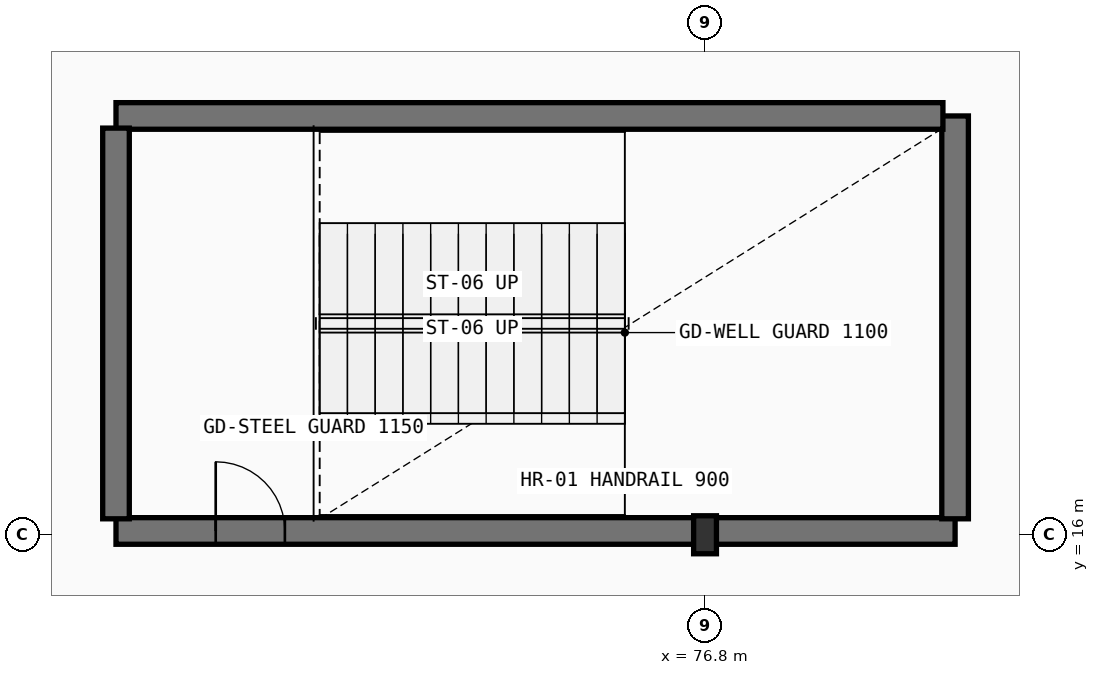
"""IFC4 building model, lengths in metres.
Left out: names, types, materials, properties, quantities, classifications, styles, units other than length and angle.
Written with IfcOpenShell. Run it as: python <this file> out.ifc"""

import sys

from ifc_helpers import new_model, si_unit, direction, frame, frame_2d, origin, origin_2d, place, context, subcontext, project, spatial, rectangle, i_section, extrude, element, fill, save


model = new_model("IFC4")
c1 = context("Model", 3, precision=1e-05, world=origin(), true_north=direction((0.0, 1.0)))
c2 = subcontext(c1, "Body", "Model", "MODEL_VIEW")
j1 = project(units=[si_unit("LENGTHUNIT", "METRE"), si_unit("PLANEANGLEUNIT", "RADIAN")], contexts=[c1])
p1 = place(None, origin())
s1 = spatial("IfcSite", under=j1, at=p1, CompositionType="ELEMENT")
p2 = place(p1, origin())
s2 = spatial("IfcBuilding", under=s1, at=p2, CompositionType="ELEMENT")
p3 = place(p2, frame((0.0, 0.0, 20.4)))
s3 = spatial("IfcBuildingStorey", under=s2, at=p3, CompositionType="ELEMENT", Elevation=20.4)
p4 = place(p3, frame((76.8, 16.0, 0.0), z_axis=(0.0, 0.0, 1.0), x_axis=(1.0, 0.0, 0.0)))
e1 = element("IfcColumn", 1, at=p4, inside=s3, PredefinedType="COLUMN", context=c2, shape_type="SweptSolid", body=[
    extrude(i_section(OverallWidth=0.3, OverallDepth=0.5, WebThickness=0.014, FlangeThickness=0.028, FilletRadius=0.027, at=origin_2d()), origin(), (0.0, 0.0, 1.0), 4.5),
])
p5 = place(p3, frame((69.05, 16.05, 0.0), z_axis=(0.0, 0.0, 1.0), x_axis=(1.0, 0.0, 0.0)))
e2 = element("IfcWall", 2, at=p5, inside=s3, PredefinedType="SHEAR", context=c2, shape_type="SweptSolid", body=[
    extrude(rectangle(XDim=11.04, YDim=0.35, at=frame_2d((5.52, 0.0))), origin(), (0.0, 0.0, 1.0), 4.25),
])
p6 = place(p5, frame((1.312, 0.0, 0.0)))
e3 = element("IfcOpeningElement", 3, at=p6, cuts=e2, PredefinedType="OPENING", context=c2, shape_type="SweptSolid", body=[
    extrude(rectangle(XDim=0.91, YDim=2.08, at=frame_2d((0.455, 1.04))), frame((0.0, 0.185, 0.0), z_axis=(0.0, -1.0, 0.0), x_axis=(1.0, 0.0, 0.0)), (0.0, 0.0, 1.0), 0.37),
])
p7 = place(p3, frame((80.09, 16.21, 0.0), z_axis=(0.0, 0.0, 1.0), x_axis=(0.0, 1.0, 0.0)))
e4 = element("IfcWall", 4, at=p7, inside=s3, PredefinedType="SHEAR", context=c2, shape_type="SweptSolid", body=[
    extrude(rectangle(XDim=5.3, YDim=0.35, at=frame_2d((2.65, 0.0))), origin(), (0.0, 0.0, 1.0), 4.25),
])
p8 = place(p3, frame((79.93, 21.51, 0.0), z_axis=(0.0, 0.0, 1.0), x_axis=(-1.0, 0.0, 0.0)))
e5 = element("IfcWall", 5, at=p8, inside=s3, PredefinedType="SHEAR", context=c2, shape_type="SweptSolid", body=[
    extrude(rectangle(XDim=10.88, YDim=0.35, at=frame_2d((5.44, 0.0))), origin(), (0.0, 0.0, 1.0), 4.25),
])
p9 = place(p3, frame((69.05, 21.35, 0.0), z_axis=(0.0, 0.0, 1.0), x_axis=(0.0, -1.0, 0.0)))
e6 = element("IfcWall", 6, at=p9, inside=s3, PredefinedType="SHEAR", context=c2, shape_type="SweptSolid", body=[
    extrude(rectangle(XDim=5.14, YDim=0.35, at=frame_2d((2.57, 0.0))), origin(), (0.0, 0.0, 1.0), 4.25),
])
p10 = place(p6, origin())
e7 = element("IfcDoor", 7, at=p10, inside=s3, OperationType="SINGLE_SWING_LEFT", PredefinedType="DOOR", context=c2, shape_type="SweptSolid", body=[
    extrude(rectangle(XDim=0.91, YDim=2.08, at=frame_2d((0.455, 1.04))), frame((0.0, 0.025, 0.0), z_axis=(0.0, -1.0, 0.0), x_axis=(1.0, 0.0, 0.0)), (0.0, 0.0, 1.0), 0.05),
])
fill(e3, e7)
save(model, sys.argv[1])
